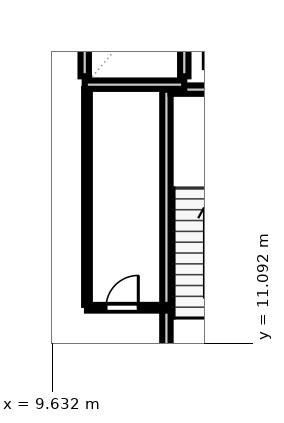
"""IFC4 building model, lengths in metres.
Left out: names, types, materials, properties, quantities, classifications, styles, units other than length and angle.
Written with IfcOpenShell. Run it as: python <this file> out.ifc"""

import sys

from ifc_helpers import new_model, si_unit, direction, frame, frame_2d, origin, place, context, subcontext, project, spatial, rectangle, extrude, element, fill, save


model = new_model("IFC4")
c1 = context("Model", 3, precision=1e-05, world=origin(), true_north=direction((0.0, 1.0)))
c2 = subcontext(c1, "Body", "Model", "MODEL_VIEW")
j1 = project(units=[si_unit("LENGTHUNIT", "METRE"), si_unit("PLANEANGLEUNIT", "RADIAN")], contexts=[c1])
p1 = place(None, origin())
s1 = spatial("IfcSite", under=j1, at=p1, CompositionType="ELEMENT")
p2 = place(p1, origin())
s2 = spatial("IfcBuilding", under=s1, at=p2, CompositionType="ELEMENT")
p3 = place(p2, frame((0.0, 0.0, 19.6)))
s3 = spatial("IfcBuildingStorey", under=s2, at=p3, CompositionType="ELEMENT", Elevation=19.6)
p4 = place(p3, frame((12.64, 10.05, 0.0), z_axis=(0.0, 0.0, 1.0), x_axis=(0.0, 1.0, 0.0)))
e1 = element("IfcWall", 1, at=p4, inside=s3, PredefinedType="SOLIDWALL", context=c2, shape_type="SweptSolid", body=[
    extrude(rectangle(XDim=7.71, YDim=0.22, at=frame_2d((3.855, 0.0))), origin(), (0.0, 0.0, 1.0), 4.34),
])
p5 = place(p3, frame((12.75, 17.76, 0.0), z_axis=(0.0, 0.0, 1.0), x_axis=(1.0, 0.0, 0.0)))
e2 = element("IfcWall", 2, at=p5, inside=s3, PredefinedType="SOLIDWALL", context=c2, shape_type="SweptSolid", body=[
    extrude(rectangle(XDim=3.6, YDim=0.22, at=frame_2d((1.8, 0.0))), origin(), (0.0, 0.0, 1.0), 4.34),
])
for number, where, z_axis, x_axis in (
    (3, (10.49, 18.11, 0.0), (0.0, 0.0, 1.0), (0.0, 1.0, 0.0)),
    (4, (13.11, 18.11, 0.0), (0.0, 0.0, 1.0), (0.0, 1.0, 0.0)),
):
    element("IfcWall", number, at=place(p3, frame(where, z_axis=z_axis, x_axis=x_axis)), inside=s3, PredefinedType="SOLIDWALL", context=c2, shape_type="SweptSolid", body=[
        extrude(rectangle(XDim=2.58, YDim=0.22, at=frame_2d((1.29, 0.0))), origin(), (0.0, 0.0, 1.0), 4.34),
    ])
p6 = place(p3, frame((10.49, 17.89, 0.0), z_axis=(0.0, 0.0, 1.0), x_axis=(1.0, 0.0, 0.0)))
e5 = element("IfcWall", 5, at=p6, inside=s3, PredefinedType="SOLIDWALL", context=c2, shape_type="SweptSolid", body=[
    extrude(rectangle(XDim=2.62, YDim=0.22, at=frame_2d((1.31, 0.0))), origin(), (0.0, 0.0, 1.0), 4.34),
])
p7 = place(p3, frame((10.55, 12.02, 0.0), z_axis=(0.0, 0.0, 1.0), x_axis=(1.0, 0.0, 0.0)))
e6 = element("IfcWall", 6, at=p7, inside=s3, PredefinedType="PARTITIONING", context=c2, shape_type="SweptSolid", body=[
    extrude(rectangle(XDim=2.08, YDim=0.15, at=frame_2d((1.04, 0.0))), origin(), (0.0, 0.0, 1.0), 4.34),
])
p8 = place(p7, frame((0.5, 0.0, 0.0)))
e7 = element("IfcOpeningElement", 7, at=p8, cuts=e6, PredefinedType="OPENING", context=c2, shape_type="SweptSolid", body=[
    extrude(rectangle(XDim=0.85, YDim=2.1, at=frame_2d((0.425, 1.05))), frame((0.0, 0.087, 0.0), z_axis=(0.0, -1.0, 0.0), x_axis=(1.0, 0.0, 0.0)), (0.0, 0.0, 1.0), 0.174),
])
p9 = place(p3, frame((10.55, 12.095, 0.0), z_axis=(0.0, 0.0, 1.0), x_axis=(0.0, 1.0, 0.0)))
e8 = element("IfcWall", 8, at=p9, inside=s3, PredefinedType="PARTITIONING", context=c2, shape_type="SweptSolid", body=[
    extrude(rectangle(XDim=5.68, YDim=0.15, at=frame_2d((2.84, 0.0))), origin(), (0.0, 0.0, 1.0), 4.34),
])
p10 = place(p8, origin())
e9 = element("IfcDoor", 9, at=p10, inside=s3, OperationType="SINGLE_SWING_RIGHT", PredefinedType="DOOR", context=c2, shape_type="SweptSolid", body=[
    extrude(rectangle(XDim=0.85, YDim=2.1, at=frame_2d((0.425, 1.05))), frame((0.0, 0.025, 0.0), z_axis=(0.0, -1.0, 0.0), x_axis=(1.0, 0.0, 0.0)), (0.0, 0.0, 1.0), 0.05),
])
fill(e7, e9)
save(model, sys.argv[1])
